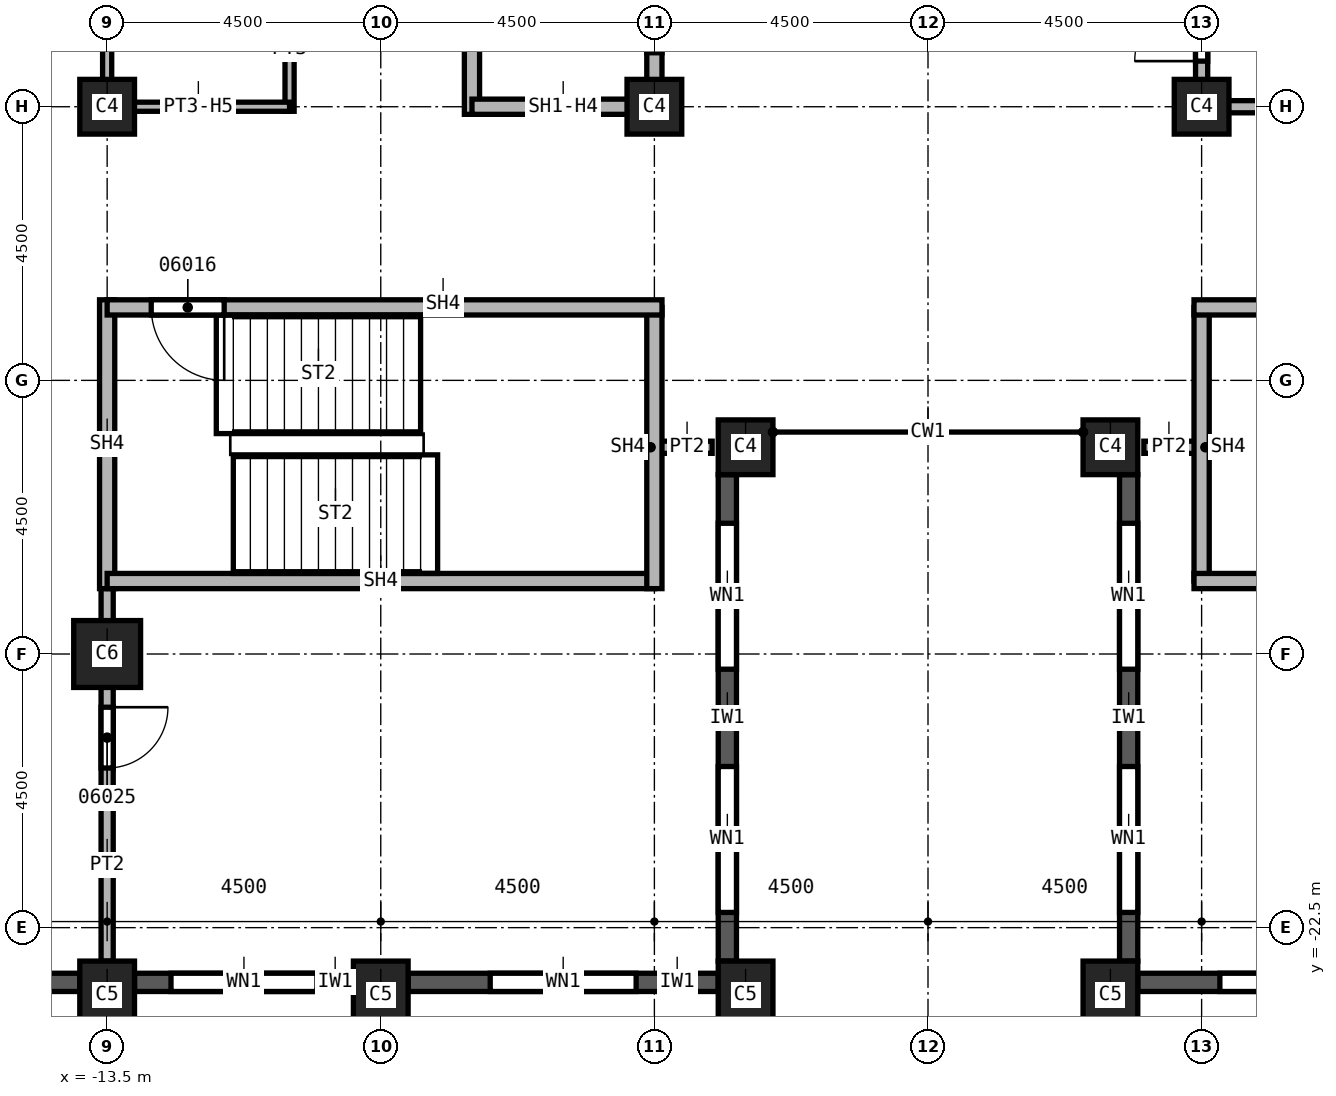
"""IFC4 building model, lengths in metres.
Left out: names, types, materials, properties, quantities, classifications, styles, units other than length and angle.
Written with IfcOpenShell. Run it as: python <this file> out.ifc"""

import sys

from ifc_helpers import new_model, si_unit, direction, frame, frame_2d, origin, origin_2d, place, context, subcontext, project, spatial, rectangle, extrude, element, fill, save


model = new_model("IFC4")
c1 = context("Model", 3, precision=1e-05, world=origin(), true_north=direction((0.0, 1.0)))
c2 = subcontext(c1, "Body", "Model", "MODEL_VIEW")
j1 = project(units=[si_unit("LENGTHUNIT", "METRE"), si_unit("PLANEANGLEUNIT", "RADIAN")], contexts=[c1])
p1 = place(None, origin())
s1 = spatial("IfcSite", under=j1, at=p1, CompositionType="ELEMENT")
p2 = place(p1, origin())
s2 = spatial("IfcBuilding", under=s1, at=p2, CompositionType="ELEMENT")
p3 = place(p2, frame((0.0, 0.0, 130.0)))
s3 = spatial("IfcBuildingStorey", under=s2, at=p3, CompositionType="ELEMENT", Elevation=130.0)
p4 = place(p3, frame((-13.5, -18.0, 0.0), z_axis=(0.0, 0.0, 1.0), x_axis=(1.0, 0.0, 0.0)))
e1 = element("IfcColumn", 1, at=p4, inside=s3, PredefinedType="COLUMN", context=c2, shape_type="SweptSolid", body=[
    extrude(rectangle(XDim=1.1, YDim=1.1, at=origin_2d()), origin(), (0.0, 0.0, 1.0), 3.7),
])
for number, where, z_axis, x_axis in (
    (2, (4.5, -9.0, 0.0), (0.0, 0.0, 1.0), (1.0, 0.0, 0.0)),
    (3, (-4.5, -9.0, 0.0), (0.0, 0.0, 1.0), (1.0, 0.0, 0.0)),
    (4, (-13.5, -9.0, 0.0), (0.0, 0.0, 1.0), (1.0, 0.0, 0.0)),
):
    element("IfcColumn", number, at=place(p3, frame(where, z_axis=z_axis, x_axis=x_axis)), inside=s3, PredefinedType="COLUMN", context=c2, shape_type="SweptSolid", body=[
        extrude(rectangle(XDim=0.9, YDim=0.9, at=origin_2d()), origin(), (0.0, 0.0, 1.0), 3.7),
    ])
for number, where, z_axis, x_axis in (
    (5, (3.0, -23.6, 0.0), (0.0, 0.0, 1.0), (1.0, 0.0, 0.0)),
    (6, (-3.0, -23.6, 0.0), (0.0, 0.0, 1.0), (1.0, 0.0, 0.0)),
    (7, (-9.0, -23.6, 0.0), (0.0, 0.0, 1.0), (1.0, 0.0, 0.0)),
    (8, (-13.5, -23.6, 0.0), (0.0, 0.0, 1.0), (1.0, 0.0, 0.0)),
):
    element("IfcColumn", number, at=place(p3, frame(where, z_axis=z_axis, x_axis=x_axis)), inside=s3, PredefinedType="COLUMN", context=c2, shape_type="SweptSolid", body=[
        extrude(rectangle(XDim=0.9, YDim=1.1, at=origin_2d()), origin(), (0.0, 0.0, 1.0), 3.7),
    ])
for number, where, z_axis, x_axis in (
    (9, (3.0, -14.6, 0.0), (0.0, 0.0, 1.0), (1.0, 0.0, 0.0)),
    (10, (-3.0, -14.6, 0.0), (0.0, 0.0, 1.0), (1.0, 0.0, 0.0)),
):
    element("IfcColumn", number, at=place(p3, frame(where, z_axis=z_axis, x_axis=x_axis)), inside=s3, PredefinedType="COLUMN", context=c2, shape_type="SweptSolid", body=[
        extrude(rectangle(XDim=0.9, YDim=0.9, at=origin_2d()), origin(), (0.0, 0.0, 1.0), 3.7),
    ])
p5 = place(p3, frame((-17.55, -23.4, 0.0), z_axis=(0.0, 0.0, 1.0), x_axis=(1.0, 0.0, 0.0)))
e11 = element("IfcWall", 11, at=p5, inside=s3, PredefinedType="SOLIDWALL", context=c2, shape_type="SweptSolid", body=[
    extrude(rectangle(XDim=3.6, YDim=0.3, at=frame_2d((1.8, 0.0))), origin(), (0.0, 0.0, 1.0), 3.1),
])
p6 = place(p5, frame((0.775, 0.0, 0.8)))
e12 = element("IfcOpeningElement", 12, at=p6, cuts=e11, PredefinedType="OPENING", context=c2, shape_type="SweptSolid", body=[
    extrude(rectangle(XDim=1.0, YDim=1.95, at=frame_2d((0.5, 0.975))), frame((0.0, 0.15, 0.0), z_axis=(0.0, -1.0, 0.0), x_axis=(1.0, 0.0, 0.0)), (0.0, 0.0, 1.0), 0.3),
])
p7 = place(p5, frame((2.375, 0.0, 0.8)))
e13 = element("IfcOpeningElement", 13, at=p7, cuts=e11, PredefinedType="OPENING", context=c2, shape_type="SweptSolid", body=[
    extrude(rectangle(XDim=0.6, YDim=1.95, at=frame_2d((0.3, 0.975))), frame((0.0, 0.15, 0.0), z_axis=(0.0, -1.0, 0.0), x_axis=(1.0, 0.0, 0.0)), (0.0, 0.0, 1.0), 0.3),
])
p8 = place(p3, frame((-13.05, -23.4, 0.0), z_axis=(0.0, 0.0, 1.0), x_axis=(1.0, 0.0, 0.0)))
e14 = element("IfcWall", 14, at=p8, inside=s3, PredefinedType="SOLIDWALL", context=c2, shape_type="SweptSolid", body=[
    extrude(rectangle(XDim=3.6, YDim=0.3, at=frame_2d((1.8, 0.0))), origin(), (0.0, 0.0, 1.0), 3.1),
])
p9 = place(p8, frame((0.6, 0.0, 0.8)))
e15 = element("IfcOpeningElement", 15, at=p9, cuts=e14, PredefinedType="OPENING", context=c2, shape_type="SweptSolid", body=[
    extrude(rectangle(XDim=2.4, YDim=1.95, at=frame_2d((1.2, 0.975))), frame((0.0, 0.15, 0.0), z_axis=(0.0, -1.0, 0.0), x_axis=(1.0, 0.0, 0.0)), (0.0, 0.0, 1.0), 0.3),
])
p10 = place(p3, frame((-8.55, -23.4, 0.0), z_axis=(0.0, 0.0, 1.0), x_axis=(1.0, 0.0, 0.0)))
e16 = element("IfcWall", 16, at=p10, inside=s3, PredefinedType="SOLIDWALL", context=c2, shape_type="SweptSolid", body=[
    extrude(rectangle(XDim=5.1, YDim=0.3, at=frame_2d((2.55, 0.0))), origin(), (0.0, 0.0, 1.0), 3.1),
])
p11 = place(p10, frame((1.35, 0.0, 0.8)))
e17 = element("IfcOpeningElement", 17, at=p11, cuts=e16, PredefinedType="OPENING", context=c2, shape_type="SweptSolid", body=[
    extrude(rectangle(XDim=2.4, YDim=1.95, at=frame_2d((1.2, 0.975))), frame((0.0, 0.15, 0.0), z_axis=(0.0, -1.0, 0.0), x_axis=(1.0, 0.0, 0.0)), (0.0, 0.0, 1.0), 0.3),
])
p12 = place(p3, frame((-3.3, -23.05, 0.0), z_axis=(0.0, 0.0, 1.0), x_axis=(0.0, 1.0, 0.0)))
e18 = element("IfcWall", 18, at=p12, inside=s3, PredefinedType="SOLIDWALL", context=c2, shape_type="SweptSolid", body=[
    extrude(rectangle(XDim=8.0, YDim=0.3, at=frame_2d((4.0, 0.0))), origin(), (0.0, 0.0, 1.0), 3.1),
])
p13 = place(p12, frame((0.8, 0.0, 0.8)))
e19 = element("IfcOpeningElement", 19, at=p13, cuts=e18, PredefinedType="OPENING", context=c2, shape_type="SweptSolid", body=[
    extrude(rectangle(XDim=2.4, YDim=1.95, at=frame_2d((1.2, 0.975))), frame((0.0, 0.15, 0.0), z_axis=(0.0, -1.0, 0.0), x_axis=(1.0, 0.0, 0.0)), (0.0, 0.0, 1.0), 0.3),
])
p14 = place(p12, frame((4.8, 0.0, 0.8)))
e20 = element("IfcOpeningElement", 20, at=p14, cuts=e18, PredefinedType="OPENING", context=c2, shape_type="SweptSolid", body=[
    extrude(rectangle(XDim=2.4, YDim=1.95, at=frame_2d((1.2, 0.975))), frame((0.0, 0.15, 0.0), z_axis=(0.0, -1.0, 0.0), x_axis=(1.0, 0.0, 0.0)), (0.0, 0.0, 1.0), 0.3),
])
p15 = place(p3, frame((3.3, -15.05, 0.0), z_axis=(0.0, 0.0, 1.0), x_axis=(0.0, -1.0, 0.0)))
e21 = element("IfcWall", 21, at=p15, inside=s3, PredefinedType="SOLIDWALL", context=c2, shape_type="SweptSolid", body=[
    extrude(rectangle(XDim=8.0, YDim=0.3, at=frame_2d((4.0, 0.0))), origin(), (0.0, 0.0, 1.0), 3.1),
])
p16 = place(p15, frame((0.8, 0.0, 0.8)))
e22 = element("IfcOpeningElement", 22, at=p16, cuts=e21, PredefinedType="OPENING", context=c2, shape_type="SweptSolid", body=[
    extrude(rectangle(XDim=2.4, YDim=1.95, at=frame_2d((1.2, 0.975))), frame((0.0, 0.15, 0.0), z_axis=(0.0, -1.0, 0.0), x_axis=(1.0, 0.0, 0.0)), (0.0, 0.0, 1.0), 0.3),
])
p17 = place(p15, frame((4.8, 0.0, 0.8)))
e23 = element("IfcOpeningElement", 23, at=p17, cuts=e21, PredefinedType="OPENING", context=c2, shape_type="SweptSolid", body=[
    extrude(rectangle(XDim=2.4, YDim=1.95, at=frame_2d((1.2, 0.975))), frame((0.0, 0.15, 0.0), z_axis=(0.0, -1.0, 0.0), x_axis=(1.0, 0.0, 0.0)), (0.0, 0.0, 1.0), 0.3),
])
p18 = place(p3, frame((3.45, -23.4, 0.0), z_axis=(0.0, 0.0, 1.0), x_axis=(1.0, 0.0, 0.0)))
e24 = element("IfcWall", 24, at=p18, inside=s3, PredefinedType="SOLIDWALL", context=c2, shape_type="SweptSolid", body=[
    extrude(rectangle(XDim=5.1, YDim=0.3, at=frame_2d((2.55, 0.0))), origin(), (0.0, 0.0, 1.0), 3.1),
])
p19 = place(p18, frame((1.35, 0.0, 0.8)))
e25 = element("IfcOpeningElement", 25, at=p19, cuts=e24, PredefinedType="OPENING", context=c2, shape_type="SweptSolid", body=[
    extrude(rectangle(XDim=2.4, YDim=1.95, at=frame_2d((1.2, 0.975))), frame((0.0, 0.15, 0.0), z_axis=(0.0, -1.0, 0.0), x_axis=(1.0, 0.0, 0.0)), (0.0, 0.0, 1.0), 0.3),
])
p20 = place(p3, frame((-13.5, -16.675, 0.0), z_axis=(0.0, 0.0, 1.0), x_axis=(0.0, -1.0, 0.0)))
e26 = element("IfcWall", 26, at=p20, inside=s3, PredefinedType="PARTITIONING", context=c2, shape_type="SweptSolid", body=[
    extrude(rectangle(XDim=6.375, YDim=0.2, at=frame_2d((3.188, 0.0))), origin(), (0.0, 0.0, 1.0), 3.7),
])
p21 = place(p20, frame((2.2, 0.0, 0.0)))
e27 = element("IfcOpeningElement", 27, at=p21, cuts=e26, PredefinedType="OPENING", context=c2, shape_type="SweptSolid", body=[
    extrude(rectangle(XDim=1.0, YDim=2.1, at=frame_2d((0.5, 1.05))), frame((0.0, 0.1, 0.0), z_axis=(0.0, -1.0, 0.0), x_axis=(1.0, 0.0, 0.0)), (0.0, 0.0, 1.0), 0.2),
])
for number, where, z_axis, x_axis in (
    (28, (-3.55, -14.6, 0.0), (0.0, 0.0, 1.0), (-1.0, 0.0, 0.0)),
    (29, (4.5, -14.6, 0.0), (0.0, 0.0, 1.0), (-1.0, 0.0, 0.0)),
):
    element("IfcWall", number, at=place(p3, frame(where, z_axis=z_axis, x_axis=x_axis)), inside=s3, PredefinedType="PARTITIONING", context=c2, shape_type="SweptSolid", body=[
        extrude(rectangle(XDim=0.95, YDim=0.2, at=frame_2d((0.475, 0.0))), origin(), (0.0, 0.0, 1.0), 3.7),
    ])
p22 = place(p3, frame((4.5, -9.1, 0.0), z_axis=(0.0, 0.0, 1.0), x_axis=(0.0, 1.0, 0.0)))
e30 = element("IfcWall", 30, at=p22, inside=s3, PredefinedType="SOLIDWALL", context=c2, shape_type="SweptSolid", body=[
    extrude(rectangle(XDim=9.1, YDim=0.2, at=frame_2d((4.55, 0.0))), origin(), (0.0, 0.0, 1.0), 2.938),
])
p23 = place(p22, frame((0.85, 0.0, 0.0)))
e31 = element("IfcOpeningElement", 31, at=p23, cuts=e30, PredefinedType="OPENING", context=c2, shape_type="SweptSolid", body=[
    extrude(rectangle(XDim=1.1, YDim=2.1, at=frame_2d((0.55, 1.05))), frame((0.0, 0.1, 0.0), z_axis=(0.0, -1.0, 0.0), x_axis=(1.0, 0.0, 0.0)), (0.0, 0.0, 1.0), 0.2),
])
p24 = place(p22, frame((7.25, 0.0, 0.0)))
e32 = element("IfcOpeningElement", 32, at=p24, cuts=e30, PredefinedType="OPENING", context=c2, shape_type="SweptSolid", body=[
    extrude(rectangle(XDim=1.1, YDim=2.1, at=frame_2d((0.55, 1.05))), frame((0.0, 0.1, 0.0), z_axis=(0.0, -1.0, 0.0), x_axis=(1.0, 0.0, 0.0)), (0.0, 0.0, 1.0), 0.2),
])
p25 = place(p3, frame((7.5, -9.0, 0.0), z_axis=(0.0, 0.0, 1.0), x_axis=(-1.0, 0.0, 0.0)))
e33 = element("IfcWall", 33, at=p25, inside=s3, PredefinedType="SOLIDWALL", context=c2, shape_type="SweptSolid", body=[
    extrude(rectangle(XDim=3.0, YDim=0.2, at=frame_2d((1.5, 0.0))), origin(), (0.0, 0.0, 1.0), 2.938),
])
p26 = place(p3, frame((-7.5, -9.125, 0.0), z_axis=(0.0, 0.0, 1.0), x_axis=(0.0, 1.0, 0.0)))
e34 = element("IfcWall", 34, at=p26, inside=s3, PredefinedType="SOLIDWALL", context=c2, shape_type="SweptSolid", body=[
    extrude(rectangle(XDim=12.25, YDim=0.25, at=frame_2d((6.125, 0.0))), origin(), (0.0, 0.0, 1.0), 3.7),
])
p27 = place(p3, frame((-4.5, -9.0, 0.0), z_axis=(0.0, 0.0, 1.0), x_axis=(-1.0, 0.0, 0.0)))
e35 = element("IfcWall", 35, at=p27, inside=s3, PredefinedType="SOLIDWALL", context=c2, shape_type="SweptSolid", body=[
    extrude(rectangle(XDim=3.0, YDim=0.25, at=frame_2d((1.5, 0.0))), origin(), (0.0, 0.0, 1.0), 2.938),
])
p28 = place(p3, frame((-4.5, 0.0, 0.0), z_axis=(0.0, 0.0, 1.0), x_axis=(0.0, -1.0, 0.0)))
e36 = element("IfcWall", 36, at=p28, inside=s3, PredefinedType="SOLIDWALL", context=c2, shape_type="SweptSolid", body=[
    extrude(rectangle(XDim=9.125, YDim=0.25, at=frame_2d((4.562, 0.0))), origin(), (0.0, 0.0, 1.0), 2.938),
])
p29 = place(p28, frame((7.012, 0.0, 0.0)))
e37 = element("IfcOpeningElement", 37, at=p29, cuts=e36, PredefinedType="OPENING", context=c2, shape_type="SweptSolid", body=[
    extrude(rectangle(XDim=1.1, YDim=2.1, at=frame_2d((0.55, 1.05))), frame((0.0, 0.125, 0.0), z_axis=(0.0, -1.0, 0.0), x_axis=(1.0, 0.0, 0.0)), (0.0, 0.0, 1.0), 0.25),
])
p30 = place(p28, frame((3.95, 0.0, 0.0)))
e38 = element("IfcOpeningElement", 38, at=p30, cuts=e36, PredefinedType="OPENING", context=c2, shape_type="SweptSolid", body=[
    extrude(rectangle(XDim=1.1, YDim=2.1, at=frame_2d((0.55, 1.05))), frame((0.0, 0.125, 0.0), z_axis=(0.0, -1.0, 0.0), x_axis=(1.0, 0.0, 0.0)), (0.0, 0.0, 1.0), 0.25),
])
p31 = place(p28, frame((0.95, 0.0, 0.0)))
e39 = element("IfcOpeningElement", 39, at=p31, cuts=e36, PredefinedType="OPENING", context=c2, shape_type="SweptSolid", body=[
    extrude(rectangle(XDim=1.1, YDim=2.1, at=frame_2d((0.55, 1.05))), frame((0.0, 0.125, 0.0), z_axis=(0.0, -1.0, 0.0), x_axis=(1.0, 0.0, 0.0)), (0.0, 0.0, 1.0), 0.25),
])
p32 = place(p3, frame((-13.5, -12.175, 0.0), z_axis=(0.0, 0.0, 1.0), x_axis=(0.0, -1.0, 0.0)))
e40 = element("IfcWall", 40, at=p32, inside=s3, PredefinedType="SOLIDWALL", context=c2, shape_type="SweptSolid", body=[
    extrude(rectangle(XDim=4.75, YDim=0.25, at=frame_2d((2.375, 0.0))), origin(), (0.0, 0.0, 1.0), 3.7),
])
p33 = place(p3, frame((-4.5, -16.8, 0.0), z_axis=(0.0, 0.0, 1.0), x_axis=(-1.0, 0.0, 0.0)))
e41 = element("IfcWall", 41, at=p33, inside=s3, PredefinedType="SOLIDWALL", context=c2, shape_type="SweptSolid", body=[
    extrude(rectangle(XDim=9.0, YDim=0.25, at=frame_2d((4.5, 0.0))), origin(), (0.0, 0.0, 1.0), 3.7),
])
p34 = place(p3, frame((-4.5, -12.3, 0.0), z_axis=(0.0, 0.0, 1.0), x_axis=(0.0, -1.0, 0.0)))
e42 = element("IfcWall", 42, at=p34, inside=s3, PredefinedType="SOLIDWALL", context=c2, shape_type="SweptSolid", body=[
    extrude(rectangle(XDim=4.625, YDim=0.25, at=frame_2d((2.312, 0.0))), origin(), (0.0, 0.0, 1.0), 3.7),
])
p35 = place(p3, frame((-4.375, -12.3, 0.0), z_axis=(0.0, 0.0, 1.0), x_axis=(-1.0, 0.0, 0.0)))
e43 = element("IfcWall", 43, at=p35, inside=s3, PredefinedType="SOLIDWALL", context=c2, shape_type="SweptSolid", body=[
    extrude(rectangle(XDim=9.125, YDim=0.25, at=frame_2d((4.562, 0.0))), origin(), (0.0, 0.0, 1.0), 3.7),
])
p36 = place(p35, frame((7.2, 0.0, 0.0)))
e44 = element("IfcOpeningElement", 44, at=p36, cuts=e43, PredefinedType="OPENING", context=c2, shape_type="SweptSolid", body=[
    extrude(rectangle(XDim=1.2, YDim=2.1, at=frame_2d((0.6, 1.05))), frame((0.0, 0.125, 0.0), z_axis=(0.0, -1.0, 0.0), x_axis=(1.0, 0.0, 0.0)), (0.0, 0.0, 1.0), 0.25),
])
p37 = place(p3, frame((4.5, -16.8, 0.0), z_axis=(0.0, 0.0, 1.0), x_axis=(0.0, 1.0, 0.0)))
e45 = element("IfcWall", 45, at=p37, inside=s3, PredefinedType="SOLIDWALL", context=c2, shape_type="SweptSolid", body=[
    extrude(rectangle(XDim=4.5, YDim=0.25, at=frame_2d((2.25, 0.0))), origin(), (0.0, 0.0, 1.0), 3.7),
])
p38 = place(p3, frame((13.5, -16.8, 0.0), z_axis=(0.0, 0.0, 1.0), x_axis=(-1.0, 0.0, 0.0)))
e46 = element("IfcWall", 46, at=p38, inside=s3, PredefinedType="SOLIDWALL", context=c2, shape_type="SweptSolid", body=[
    extrude(rectangle(XDim=9.125, YDim=0.25, at=frame_2d((4.562, 0.0))), origin(), (0.0, 0.0, 1.0), 3.7),
])
p39 = place(p3, frame((13.5, -12.3, 0.0), z_axis=(0.0, 0.0, 1.0), x_axis=(-1.0, 0.0, 0.0)))
e47 = element("IfcWall", 47, at=p39, inside=s3, PredefinedType="SOLIDWALL", context=c2, shape_type="SweptSolid", body=[
    extrude(rectangle(XDim=9.125, YDim=0.25, at=frame_2d((4.562, 0.0))), origin(), (0.0, 0.0, 1.0), 3.7),
])
p40 = place(p39, frame((0.6, 0.0, 0.0)))
e48 = element("IfcOpeningElement", 48, at=p40, cuts=e47, PredefinedType="OPENING", context=c2, shape_type="SweptSolid", body=[
    extrude(rectangle(XDim=1.2, YDim=2.1, at=frame_2d((0.6, 1.05))), frame((0.0, 0.125, 0.0), z_axis=(0.0, -1.0, 0.0), x_axis=(1.0, 0.0, 0.0)), (0.0, 0.0, 1.0), 0.25),
])
p41 = place(p3, frame((-13.5, -9.075, 0.0), z_axis=(0.0, 0.0, 1.0), x_axis=(0.0, 1.0, 0.0)))
e49 = element("IfcWall", 49, at=p41, inside=s3, PredefinedType="PARTITIONING", context=c2, shape_type="SweptSolid", body=[
    extrude(rectangle(XDim=3.075, YDim=0.15, at=frame_2d((1.538, 0.0))), origin(), (0.0, 0.0, 1.0), 2.938),
])
p42 = place(p3, frame((-10.5, -9.075, 0.0), z_axis=(0.0, 0.0, 1.0), x_axis=(0.0, 1.0, 0.0)))
e50 = element("IfcWall", 50, at=p42, inside=s3, PredefinedType="PARTITIONING", context=c2, shape_type="SweptSolid", body=[
    extrude(rectangle(XDim=3.15, YDim=0.15, at=frame_2d((1.575, 0.0))), origin(), (0.0, 0.0, 1.0), 3.7),
])
p43 = place(p42, frame((1.9, 0.0, 0.0)))
e51 = element("IfcOpeningElement", 51, at=p43, cuts=e50, PredefinedType="OPENING", context=c2, shape_type="SweptSolid", body=[
    extrude(rectangle(XDim=0.9, YDim=2.1, at=frame_2d((0.45, 1.05))), frame((0.0, 0.075, 0.0), z_axis=(0.0, -1.0, 0.0), x_axis=(1.0, 0.0, 0.0)), (0.0, 0.0, 1.0), 0.15),
])
p44 = place(p3, frame((-10.5, -9.0, 0.0), z_axis=(0.0, 0.0, 1.0), x_axis=(-1.0, 0.0, 0.0)))
e52 = element("IfcWall", 52, at=p44, inside=s3, PredefinedType="PARTITIONING", context=c2, shape_type="SweptSolid", body=[
    extrude(rectangle(XDim=3.0, YDim=0.15, at=frame_2d((1.5, 0.0))), origin(), (0.0, 0.0, 1.0), 2.938),
])
p45 = place(p9, origin())
e53 = element("IfcWindow", 53, at=p45, inside=s3, PartitioningType="SINGLE_PANEL", PredefinedType="WINDOW", context=c2, shape_type="SweptSolid", body=[
    extrude(rectangle(XDim=2.4, YDim=1.95, at=frame_2d((1.2, 0.975))), frame((0.0, 0.03, 0.0), z_axis=(0.0, -1.0, 0.0), x_axis=(1.0, 0.0, 0.0)), (0.0, 0.0, 1.0), 0.06),
])
fill(e15, e53)
p46 = place(p11, origin())
e54 = element("IfcWindow", 54, at=p46, inside=s3, PartitioningType="SINGLE_PANEL", PredefinedType="WINDOW", context=c2, shape_type="SweptSolid", body=[
    extrude(rectangle(XDim=2.4, YDim=1.95, at=frame_2d((1.2, 0.975))), frame((0.0, 0.03, 0.0), z_axis=(0.0, -1.0, 0.0), x_axis=(1.0, 0.0, 0.0)), (0.0, 0.0, 1.0), 0.06),
])
fill(e17, e54)
p47 = place(p13, origin())
e55 = element("IfcWindow", 55, at=p47, inside=s3, PartitioningType="SINGLE_PANEL", PredefinedType="WINDOW", context=c2, shape_type="SweptSolid", body=[
    extrude(rectangle(XDim=2.4, YDim=1.95, at=frame_2d((1.2, 0.975))), frame((0.0, 0.03, 0.0), z_axis=(0.0, -1.0, 0.0), x_axis=(1.0, 0.0, 0.0)), (0.0, 0.0, 1.0), 0.06),
])
fill(e19, e55)
p48 = place(p14, origin())
e56 = element("IfcWindow", 56, at=p48, inside=s3, PartitioningType="SINGLE_PANEL", PredefinedType="WINDOW", context=c2, shape_type="SweptSolid", body=[
    extrude(rectangle(XDim=2.4, YDim=1.95, at=frame_2d((1.2, 0.975))), frame((0.0, 0.03, 0.0), z_axis=(0.0, -1.0, 0.0), x_axis=(1.0, 0.0, 0.0)), (0.0, 0.0, 1.0), 0.06),
])
fill(e20, e56)
p49 = place(p16, origin())
e57 = element("IfcWindow", 57, at=p49, inside=s3, PartitioningType="SINGLE_PANEL", PredefinedType="WINDOW", context=c2, shape_type="SweptSolid", body=[
    extrude(rectangle(XDim=2.4, YDim=1.95, at=frame_2d((1.2, 0.975))), frame((0.0, 0.03, 0.0), z_axis=(0.0, -1.0, 0.0), x_axis=(1.0, 0.0, 0.0)), (0.0, 0.0, 1.0), 0.06),
])
fill(e22, e57)
p50 = place(p17, origin())
e58 = element("IfcWindow", 58, at=p50, inside=s3, PartitioningType="SINGLE_PANEL", PredefinedType="WINDOW", context=c2, shape_type="SweptSolid", body=[
    extrude(rectangle(XDim=2.4, YDim=1.95, at=frame_2d((1.2, 0.975))), frame((0.0, 0.03, 0.0), z_axis=(0.0, -1.0, 0.0), x_axis=(1.0, 0.0, 0.0)), (0.0, 0.0, 1.0), 0.06),
])
fill(e23, e58)
p51 = place(p19, origin())
e59 = element("IfcWindow", 59, at=p51, inside=s3, PartitioningType="SINGLE_PANEL", PredefinedType="WINDOW", context=c2, shape_type="SweptSolid", body=[
    extrude(rectangle(XDim=2.4, YDim=1.95, at=frame_2d((1.2, 0.975))), frame((0.0, 0.03, 0.0), z_axis=(0.0, -1.0, 0.0), x_axis=(1.0, 0.0, 0.0)), (0.0, 0.0, 1.0), 0.06),
])
fill(e25, e59)
p52 = place(p23, origin())
e60 = element("IfcDoor", 60, at=p52, inside=s3, OperationType="SINGLE_SWING_LEFT", PredefinedType="DOOR", context=c2, shape_type="SweptSolid", body=[
    extrude(rectangle(XDim=1.1, YDim=2.1, at=frame_2d((0.55, 1.05))), frame((0.0, 0.025, 0.0), z_axis=(0.0, -1.0, 0.0), x_axis=(1.0, 0.0, 0.0)), (0.0, 0.0, 1.0), 0.05),
])
fill(e31, e60)
p53 = place(p36, origin())
e61 = element("IfcDoor", 61, at=p53, inside=s3, OperationType="SINGLE_SWING_LEFT", PredefinedType="DOOR", context=c2, shape_type="SweptSolid", body=[
    extrude(rectangle(XDim=1.2, YDim=2.1, at=frame_2d((0.6, 1.05))), frame((0.0, 0.025, 0.0), z_axis=(0.0, -1.0, 0.0), x_axis=(1.0, 0.0, 0.0)), (0.0, 0.0, 1.0), 0.05),
])
fill(e44, e61)
p54 = place(p21, origin())
e62 = element("IfcDoor", 62, at=p54, inside=s3, OperationType="SINGLE_SWING_RIGHT", PredefinedType="DOOR", context=c2, shape_type="SweptSolid", body=[
    extrude(rectangle(XDim=1.0, YDim=2.1, at=frame_2d((0.5, 1.05))), frame((0.0, 0.025, 0.0), z_axis=(0.0, -1.0, 0.0), x_axis=(1.0, 0.0, 0.0)), (0.0, 0.0, 1.0), 0.05),
])
fill(e27, e62)
p55 = place(p29, origin())
e63 = element("IfcDoor", 63, at=p55, inside=s3, OperationType="SLIDING_TO_LEFT", PredefinedType="DOOR", context=c2, shape_type="SweptSolid", body=[
    extrude(rectangle(XDim=1.1, YDim=2.1, at=frame_2d((0.55, 1.05))), frame((0.0, 0.025, 0.0), z_axis=(0.0, -1.0, 0.0), x_axis=(1.0, 0.0, 0.0)), (0.0, 0.0, 1.0), 0.05),
])
fill(e37, e63)
save(model, sys.argv[1])
